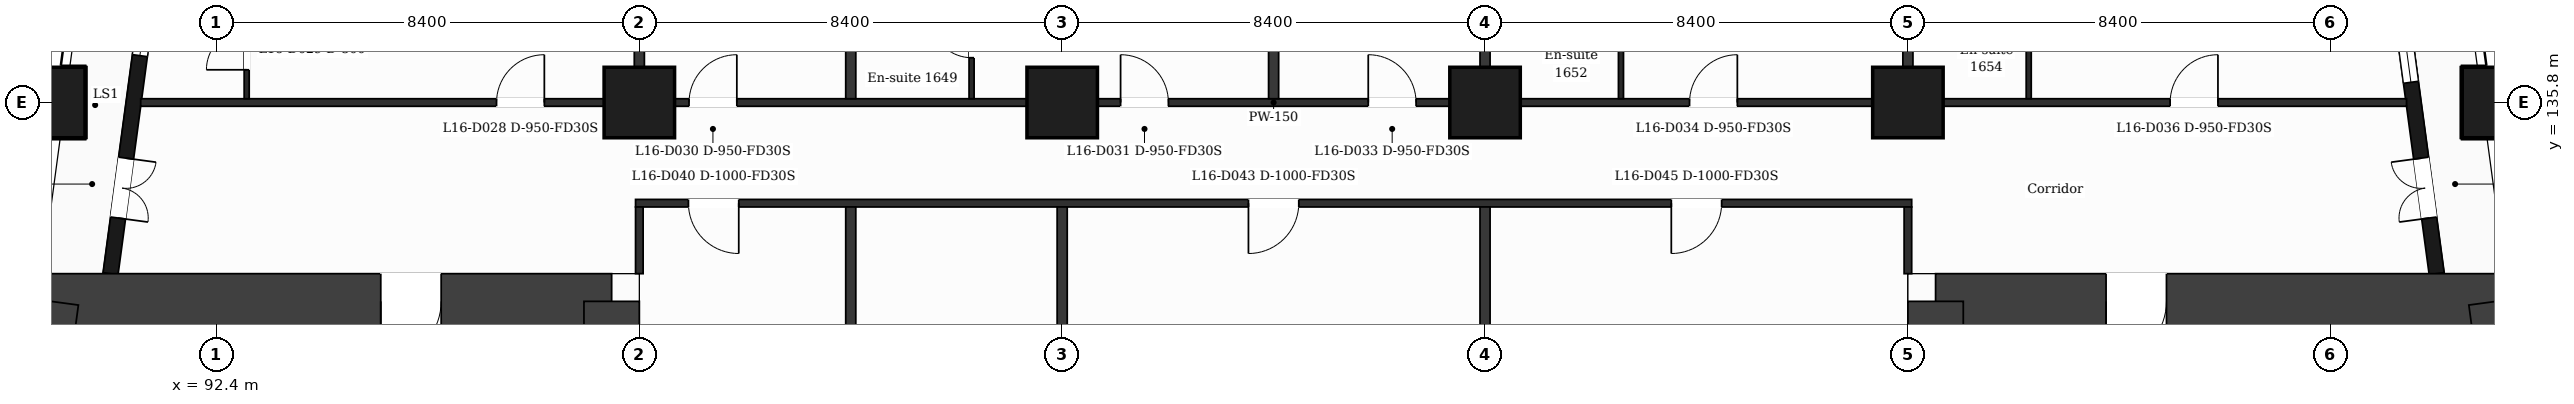
"""IFC4 building model, lengths in metres.
Left out: names, types, materials, properties, quantities, classifications, styles, units other than length and angle.
Written with IfcOpenShell. Run it as: python <this file> out.ifc"""

import sys

from ifc_helpers import new_model, si_unit, direction, frame, frame_2d, origin, origin_2d, place, context, subcontext, project, spatial, rectangle, extrude, element, fill, save


model = new_model("IFC4")
c1 = context("Model", 3, precision=1e-05, world=origin(), true_north=direction((0.0, 1.0)))
c2 = subcontext(c1, "Body", "Model", "MODEL_VIEW")
j1 = project(units=[si_unit("LENGTHUNIT", "METRE"), si_unit("PLANEANGLEUNIT", "RADIAN")], contexts=[c1])
p1 = place(None, origin())
s1 = spatial("IfcSite", under=j1, at=p1, CompositionType="ELEMENT")
p2 = place(p1, origin())
s2 = spatial("IfcBuilding", under=s1, at=p2, CompositionType="ELEMENT")
p3 = place(p2, frame((0.0, 0.0, 74.0)))
s3 = spatial("IfcBuildingStorey", under=s2, at=p3, CompositionType="ELEMENT", Elevation=74.0)
p4 = place(p3, frame((89.112, 131.85, 0.0), z_axis=(0.0, 0.0, 1.0), x_axis=(1.0, 0.0, 0.0)))
e1 = element("IfcWall", 1, at=p4, inside=s3, PredefinedType="SHEAR", context=c2, shape_type="SweptSolid", body=[
    extrude(rectangle(XDim=11.138, YDim=1.1, at=frame_2d((5.569, 0.0))), origin(), (0.0, 0.0, 1.0), 3.5),
])
p5 = place(p4, frame((6.552, 0.0, 0.0)))
e2 = element("IfcOpeningElement", 2, at=p5, cuts=e1, PredefinedType="OPENING", context=c2, shape_type="SweptSolid", body=[
    extrude(rectangle(XDim=1.2, YDim=2.1, at=frame_2d((0.6, 1.05))), frame((0.0, 0.56, 0.0), z_axis=(0.0, -1.0, 0.0), x_axis=(1.0, 0.0, 0.0)), (0.0, 0.0, 1.0), 1.12),
])
p6 = place(p3, frame((100.25, 131.85, 0.0), z_axis=(0.0, 0.0, 1.0), x_axis=(0.0, -1.0, 0.0)))
e3 = element("IfcWall", 3, at=p6, inside=s3, PredefinedType="SHEAR", context=c2, shape_type="SweptSolid", body=[
    extrude(rectangle(XDim=20.9, YDim=1.1, at=frame_2d((10.45, 0.0))), origin(), (0.0, 0.0, 1.0), 3.5),
])
p7 = place(p3, frame((86.298, 110.95, 0.0), z_axis=(0.0, 0.0, 1.0), x_axis=(0.133400422634, 0.99106222168, 0.0)))
e4 = element("IfcWall", 4, at=p7, inside=s3, PredefinedType="SHEAR", context=c2, shape_type="SweptSolid", body=[
    extrude(rectangle(XDim=21.089, YDim=1.1, at=frame_2d((10.544, 0.0))), origin(), (0.0, 0.0, 1.0), 3.5),
])
p8 = place(p3, frame((126.55, 131.85, 0.0), z_axis=(0.0, 0.0, 1.0), x_axis=(1.0, 0.0, 0.0)))
e5 = element("IfcWall", 5, at=p8, inside=s3, PredefinedType="SHEAR", context=c2, shape_type="SweptSolid", body=[
    extrude(rectangle(XDim=11.138, YDim=1.1, at=frame_2d((5.569, 0.0))), origin(), (0.0, 0.0, 1.0), 3.5),
])
p9 = place(p8, frame((3.386, 0.0, 0.0)))
e6 = element("IfcOpeningElement", 6, at=p9, cuts=e5, PredefinedType="OPENING", context=c2, shape_type="SweptSolid", body=[
    extrude(rectangle(XDim=1.2, YDim=2.1, at=frame_2d((0.6, 1.05))), frame((0.0, 0.56, 0.0), z_axis=(0.0, -1.0, 0.0), x_axis=(1.0, 0.0, 0.0)), (0.0, 0.0, 1.0), 1.12),
])
p10 = place(p3, frame((137.688, 131.85, 0.0), z_axis=(0.0, 0.0, 1.0), x_axis=(0.133411793472, -0.991060691059, 0.0)))
e7 = element("IfcWall", 7, at=p10, inside=s3, PredefinedType="SHEAR", context=c2, shape_type="SweptSolid", body=[
    extrude(rectangle(XDim=21.089, YDim=1.1, at=frame_2d((10.544, 0.0))), origin(), (0.0, 0.0, 1.0), 3.5),
])
p11 = place(p3, frame((126.55, 110.95, 0.0), z_axis=(0.0, 0.0, 1.0), x_axis=(0.0, 1.0, 0.0)))
e8 = element("IfcWall", 8, at=p11, inside=s3, PredefinedType="SHEAR", context=c2, shape_type="SweptSolid", body=[
    extrude(rectangle(XDim=20.9, YDim=1.1, at=frame_2d((10.45, 0.0))), origin(), (0.0, 0.0, 1.0), 3.5),
])
for number, where, z_axis, x_axis in (
    (9, (100.8, 135.8, 0.0), (0.0, 0.0, 1.0), (1.0, 0.0, 0.0)),
    (10, (109.2, 135.8, 0.0), (0.0, 0.0, 1.0), (1.0, 0.0, 0.0)),
    (11, (117.6, 135.8, 0.0), (0.0, 0.0, 1.0), (1.0, 0.0, 0.0)),
    (12, (126.0, 135.8, 0.0), (0.0, 0.0, 1.0), (1.0, 0.0, 0.0)),
    (13, (89.088, 135.8, 0.0), (0.0, 0.0, 1.0), (1.0, 0.0, 0.0)),
    (14, (137.711, 135.8, 0.0), (0.0, 0.0, 1.0), (1.0, 0.0, 0.0)),
):
    element("IfcColumn", number, at=place(p3, frame(where, z_axis=z_axis, x_axis=x_axis)), inside=s3, PredefinedType="COLUMN", context=c2, shape_type="SweptSolid", body=[
        extrude(rectangle(XDim=1.4, YDim=1.4, at=origin_2d()), origin(), (0.0, 0.0, 1.0), 3.5),
    ])
p12 = place(p3, frame((136.504, 132.4, 0.0), z_axis=(0.0, 0.0, 1.0), x_axis=(-0.133399697462, 0.99106231929, 0.0)))
e15 = element("IfcWall", 15, at=p12, inside=s3, PredefinedType="SOLIDWALL", context=c2, shape_type="SweptSolid", body=[
    extrude(rectangle(XDim=6.74, YDim=0.3, at=frame_2d((3.37, 0.0))), origin(), (0.0, 0.0, 1.0), 3.18),
])
p13 = place(p12, frame((1.115, 0.0, 0.0)))
e16 = element("IfcOpeningElement", 16, at=p13, cuts=e15, PredefinedType="OPENING", context=c2, shape_type="SweptSolid", body=[
    extrude(rectangle(XDim=1.2, YDim=2.4, at=frame_2d((0.6, 1.2))), frame((0.0, 0.16, 0.0), z_axis=(0.0, -1.0, 0.0), x_axis=(1.0, 0.0, 0.0)), (0.0, 0.0, 1.0), 0.32),
])
p14 = place(p12, frame((3.835, 0.0, 0.9)))
e17 = element("IfcOpeningElement", 17, at=p14, cuts=e15, PredefinedType="OPENING", context=c2, shape_type="SweptSolid", body=[
    extrude(rectangle(XDim=2.4, YDim=2.1, at=frame_2d((1.2, 1.05))), frame((0.0, 0.16, 0.0), z_axis=(0.0, -1.0, 0.0), x_axis=(1.0, 0.0, 0.0)), (0.0, 0.0, 1.0), 0.32),
])
p15 = place(p3, frame((91.177, 138.95, 0.0), z_axis=(0.0, 0.0, 1.0), x_axis=(-0.133426664613, -0.991058689065, 0.0)))
e18 = element("IfcWall", 18, at=p15, inside=s3, PredefinedType="SOLIDWALL", context=c2, shape_type="SweptSolid", body=[
    extrude(rectangle(XDim=6.609, YDim=0.3, at=frame_2d((3.305, 0.0))), origin(), (0.0, 0.0, 1.0), 3.18),
])
p16 = place(p15, frame((1.039, 0.0, 0.9)))
e19 = element("IfcOpeningElement", 19, at=p16, cuts=e18, PredefinedType="OPENING", context=c2, shape_type="SweptSolid", body=[
    extrude(rectangle(XDim=1.2, YDim=2.1, at=frame_2d((0.6, 1.05))), frame((0.0, 0.16, 0.0), z_axis=(0.0, -1.0, 0.0), x_axis=(1.0, 0.0, 0.0)), (0.0, 0.0, 1.0), 0.32),
])
p17 = place(p15, frame((4.294, 0.0, 0.0)))
e20 = element("IfcOpeningElement", 20, at=p17, cuts=e18, PredefinedType="OPENING", context=c2, shape_type="SweptSolid", body=[
    extrude(rectangle(XDim=1.2, YDim=2.4, at=frame_2d((0.6, 1.2))), frame((0.0, 0.16, 0.0), z_axis=(0.0, -1.0, 0.0), x_axis=(1.0, 0.0, 0.0)), (0.0, 0.0, 1.0), 0.32),
])
p18 = place(p3, frame((100.725, 133.8, 0.0), z_axis=(0.0, 0.0, 1.0), x_axis=(1.0, 0.0, 0.0)))
e21 = element("IfcWall", 21, at=p18, inside=s3, PredefinedType="PARTITIONING", context=c2, shape_type="SweptSolid", body=[
    extrude(rectangle(XDim=25.35, YDim=0.15, at=frame_2d((12.675, 0.0))), origin(), (0.0, 0.0, 1.0), 3.18),
])
p19 = place(p18, frame((1.05, 0.0, 0.0)))
e22 = element("IfcOpeningElement", 22, at=p19, cuts=e21, PredefinedType="OPENING", context=c2, shape_type="SweptSolid", body=[
    extrude(rectangle(XDim=1.0, YDim=2.1, at=frame_2d((0.5, 1.05))), frame((0.0, 0.085, 0.0), z_axis=(0.0, -1.0, 0.0), x_axis=(1.0, 0.0, 0.0)), (0.0, 0.0, 1.0), 0.17),
])
p20 = place(p18, frame((12.175, 0.0, 0.0)))
e23 = element("IfcOpeningElement", 23, at=p20, cuts=e21, PredefinedType="OPENING", context=c2, shape_type="SweptSolid", body=[
    extrude(rectangle(XDim=1.0, YDim=2.1, at=frame_2d((0.5, 1.05))), frame((0.0, 0.085, 0.0), z_axis=(0.0, -1.0, 0.0), x_axis=(1.0, 0.0, 0.0)), (0.0, 0.0, 1.0), 0.17),
])
p21 = place(p18, frame((20.575, 0.0, 0.0)))
e24 = element("IfcOpeningElement", 24, at=p21, cuts=e21, PredefinedType="OPENING", context=c2, shape_type="SweptSolid", body=[
    extrude(rectangle(XDim=1.0, YDim=2.1, at=frame_2d((0.5, 1.05))), frame((0.0, 0.085, 0.0), z_axis=(0.0, -1.0, 0.0), x_axis=(1.0, 0.0, 0.0)), (0.0, 0.0, 1.0), 0.17),
])
p22 = place(p3, frame((90.895, 135.8, 0.0), z_axis=(0.0, 0.0, 1.0), x_axis=(1.0, 0.0, 0.0)))
e25 = element("IfcWall", 25, at=p22, inside=s3, PredefinedType="PARTITIONING", context=c2, shape_type="SweptSolid", body=[
    extrude(rectangle(XDim=45.011, YDim=0.15, at=frame_2d((22.505, 0.0))), origin(), (0.0, 0.0, 1.0), 3.18),
])
p23 = place(p22, frame((7.068, 0.0, 0.0)))
e26 = element("IfcOpeningElement", 26, at=p23, cuts=e25, PredefinedType="OPENING", context=c2, shape_type="SweptSolid", body=[
    extrude(rectangle(XDim=0.95, YDim=2.1, at=frame_2d((0.475, 1.05))), frame((0.0, 0.085, 0.0), z_axis=(0.0, -1.0, 0.0), x_axis=(1.0, 0.0, 0.0)), (0.0, 0.0, 1.0), 0.17),
])
p24 = place(p22, frame((10.892, 0.0, 0.0)))
e27 = element("IfcOpeningElement", 27, at=p24, cuts=e25, PredefinedType="OPENING", context=c2, shape_type="SweptSolid", body=[
    extrude(rectangle(XDim=0.95, YDim=2.1, at=frame_2d((0.475, 1.05))), frame((0.0, 0.085, 0.0), z_axis=(0.0, -1.0, 0.0), x_axis=(1.0, 0.0, 0.0)), (0.0, 0.0, 1.0), 0.17),
])
p25 = place(p22, frame((19.465, 0.0, 0.0)))
e28 = element("IfcOpeningElement", 28, at=p25, cuts=e25, PredefinedType="OPENING", context=c2, shape_type="SweptSolid", body=[
    extrude(rectangle(XDim=0.95, YDim=2.1, at=frame_2d((0.475, 1.05))), frame((0.0, 0.085, 0.0), z_axis=(0.0, -1.0, 0.0), x_axis=(1.0, 0.0, 0.0)), (0.0, 0.0, 1.0), 0.17),
])
p26 = place(p22, frame((24.385, 0.0, 0.0)))
e29 = element("IfcOpeningElement", 29, at=p26, cuts=e25, PredefinedType="OPENING", context=c2, shape_type="SweptSolid", body=[
    extrude(rectangle(XDim=0.95, YDim=2.1, at=frame_2d((0.475, 1.05))), frame((0.0, 0.085, 0.0), z_axis=(0.0, -1.0, 0.0), x_axis=(1.0, 0.0, 0.0)), (0.0, 0.0, 1.0), 0.17),
])
p27 = place(p22, frame((30.767, 0.0, 0.0)))
e30 = element("IfcOpeningElement", 30, at=p27, cuts=e25, PredefinedType="OPENING", context=c2, shape_type="SweptSolid", body=[
    extrude(rectangle(XDim=0.95, YDim=2.1, at=frame_2d((0.475, 1.05))), frame((0.0, 0.085, 0.0), z_axis=(0.0, -1.0, 0.0), x_axis=(1.0, 0.0, 0.0)), (0.0, 0.0, 1.0), 0.17),
])
p28 = place(p22, frame((40.314, 0.0, 0.0)))
e31 = element("IfcOpeningElement", 31, at=p28, cuts=e25, PredefinedType="OPENING", context=c2, shape_type="SweptSolid", body=[
    extrude(rectangle(XDim=0.95, YDim=2.1, at=frame_2d((0.475, 1.05))), frame((0.0, 0.085, 0.0), z_axis=(0.0, -1.0, 0.0), x_axis=(1.0, 0.0, 0.0)), (0.0, 0.0, 1.0), 0.17),
])
p29 = place(p3, frame((93.0, 135.875, 0.0), z_axis=(0.0, 0.0, 1.0), x_axis=(0.0, 1.0, 0.0)))
e32 = element("IfcWall", 32, at=p29, inside=s3, PredefinedType="PARTITIONING", context=c2, shape_type="SweptSolid", body=[
    extrude(rectangle(XDim=2.575, YDim=0.1, at=frame_2d((1.288, 0.0))), origin(), (0.0, 0.0, 1.0), 3.18),
])
p30 = place(p29, frame((0.575, 0.0, 0.0)))
e33 = element("IfcOpeningElement", 33, at=p30, cuts=e32, PredefinedType="OPENING", context=c2, shape_type="SweptSolid", body=[
    extrude(rectangle(XDim=0.8, YDim=2.1, at=frame_2d((0.4, 1.05))), frame((0.0, 0.06, 0.0), z_axis=(0.0, -1.0, 0.0), x_axis=(1.0, 0.0, 0.0)), (0.0, 0.0, 1.0), 0.12),
])
p31 = place(p3, frame((100.8, 135.875, 0.0), z_axis=(0.0, 0.0, 1.0), x_axis=(0.0, 1.0, 0.0)))
e34 = element("IfcWall", 34, at=p31, inside=s3, PredefinedType="PARTITIONING", context=c2, shape_type="SweptSolid", body=[
    extrude(rectangle(XDim=7.135, YDim=0.2, at=frame_2d((3.567, 0.0))), origin(), (0.0, 0.0, 1.0), 3.18),
])
p32 = place(p3, frame((100.8, 132.4, 0.0), z_axis=(0.0, 0.0, 1.0), x_axis=(0.0, 1.0, 0.0)))
e35 = element("IfcWall", 35, at=p32, inside=s3, PredefinedType="PARTITIONING", context=c2, shape_type="SweptSolid", body=[
    extrude(rectangle(XDim=1.325, YDim=0.15, at=frame_2d((0.663, 0.0))), origin(), (0.0, 0.0, 1.0), 3.18),
])
p33 = place(p3, frame((105.0, 109.075, 0.0), z_axis=(0.0, 0.0, 1.0), x_axis=(0.0, 1.0, 0.0)))
e36 = element("IfcWall", 36, at=p33, inside=s3, PredefinedType="PARTITIONING", context=c2, shape_type="SweptSolid", body=[
    extrude(rectangle(XDim=24.65, YDim=0.2, at=frame_2d((12.325, 0.0))), origin(), (0.0, 0.0, 1.0), 3.18),
])
p34 = place(p3, frame((105.0, 135.875, 0.0), z_axis=(0.0, 0.0, 1.0), x_axis=(0.0, 1.0, 0.0)))
e37 = element("IfcWall", 37, at=p34, inside=s3, PredefinedType="PARTITIONING", context=c2, shape_type="SweptSolid", body=[
    extrude(rectangle(XDim=7.135, YDim=0.2, at=frame_2d((3.567, 0.0))), origin(), (0.0, 0.0, 1.0), 3.18),
])
p35 = place(p3, frame((107.4, 135.875, 0.0), z_axis=(0.0, 0.0, 1.0), x_axis=(0.0, 1.0, 0.0)))
e38 = element("IfcWall", 38, at=p35, inside=s3, PredefinedType="PARTITIONING", context=c2, shape_type="SweptSolid", body=[
    extrude(rectangle(XDim=2.275, YDim=0.1, at=frame_2d((1.137, 0.0))), origin(), (0.0, 0.0, 1.0), 3.18),
])
p36 = place(p35, frame((0.815, 0.0, 0.0)))
e39 = element("IfcOpeningElement", 39, at=p36, cuts=e38, PredefinedType="OPENING", context=c2, shape_type="SweptSolid", body=[
    extrude(rectangle(XDim=0.8, YDim=2.1, at=frame_2d((0.4, 1.05))), frame((0.0, 0.06, 0.0), z_axis=(0.0, -1.0, 0.0), x_axis=(1.0, 0.0, 0.0)), (0.0, 0.0, 1.0), 0.12),
])
p37 = place(p3, frame((109.2, 109.075, 0.0), z_axis=(0.0, 0.0, 1.0), x_axis=(0.0, 1.0, 0.0)))
e40 = element("IfcWall", 40, at=p37, inside=s3, PredefinedType="PARTITIONING", context=c2, shape_type="SweptSolid", body=[
    extrude(rectangle(XDim=24.65, YDim=0.2, at=frame_2d((12.325, 0.0))), origin(), (0.0, 0.0, 1.0), 3.18),
])
p38 = place(p3, frame((113.4, 135.875, 0.0), z_axis=(0.0, 0.0, 1.0), x_axis=(0.0, 1.0, 0.0)))
e41 = element("IfcWall", 41, at=p38, inside=s3, PredefinedType="PARTITIONING", context=c2, shape_type="SweptSolid", body=[
    extrude(rectangle(XDim=8.085, YDim=0.2, at=frame_2d((4.042, 0.0))), origin(), (0.0, 0.0, 1.0), 3.18),
])
p39 = place(p3, frame((117.6, 109.075, 0.0), z_axis=(0.0, 0.0, 1.0), x_axis=(0.0, 1.0, 0.0)))
e42 = element("IfcWall", 42, at=p39, inside=s3, PredefinedType="PARTITIONING", context=c2, shape_type="SweptSolid", body=[
    extrude(rectangle(XDim=24.65, YDim=0.2, at=frame_2d((12.325, 0.0))), origin(), (0.0, 0.0, 1.0), 3.18),
])
p40 = place(p3, frame((117.6, 135.875, 0.0), z_axis=(0.0, 0.0, 1.0), x_axis=(0.0, 1.0, 0.0)))
e43 = element("IfcWall", 43, at=p40, inside=s3, PredefinedType="PARTITIONING", context=c2, shape_type="SweptSolid", body=[
    extrude(rectangle(XDim=7.135, YDim=0.2, at=frame_2d((3.567, 0.0))), origin(), (0.0, 0.0, 1.0), 3.18),
])
p41 = place(p3, frame((120.3, 135.875, 0.0), z_axis=(0.0, 0.0, 1.0), x_axis=(0.0, 1.0, 0.0)))
e44 = element("IfcWall", 44, at=p41, inside=s3, PredefinedType="PARTITIONING", context=c2, shape_type="SweptSolid", body=[
    extrude(rectangle(XDim=1.975, YDim=0.1, at=frame_2d((0.988, 0.0))), origin(), (0.0, 0.0, 1.0), 3.18),
])
p42 = place(p3, frame((126.0, 135.875, 0.0), z_axis=(0.0, 0.0, 1.0), x_axis=(0.0, 1.0, 0.0)))
e45 = element("IfcWall", 45, at=p42, inside=s3, PredefinedType="PARTITIONING", context=c2, shape_type="SweptSolid", body=[
    extrude(rectangle(XDim=7.135, YDim=0.2, at=frame_2d((3.567, 0.0))), origin(), (0.0, 0.0, 1.0), 3.18),
])
p43 = place(p3, frame((126.0, 132.4, 0.0), z_axis=(0.0, 0.0, 1.0), x_axis=(0.0, 1.0, 0.0)))
e46 = element("IfcWall", 46, at=p43, inside=s3, PredefinedType="PARTITIONING", context=c2, shape_type="SweptSolid", body=[
    extrude(rectangle(XDim=1.325, YDim=0.15, at=frame_2d((0.663, 0.0))), origin(), (0.0, 0.0, 1.0), 3.18),
])
p44 = place(p3, frame((128.4, 135.875, 0.0), z_axis=(0.0, 0.0, 1.0), x_axis=(0.0, 1.0, 0.0)))
e47 = element("IfcWall", 47, at=p44, inside=s3, PredefinedType="PARTITIONING", context=c2, shape_type="SweptSolid", body=[
    extrude(rectangle(XDim=1.975, YDim=0.1, at=frame_2d((0.988, 0.0))), origin(), (0.0, 0.0, 1.0), 3.18),
])
p45 = place(p13, origin())
e48 = element("IfcDoor", 48, at=p45, inside=s3, OperationType="DOUBLE_DOOR_SINGLE_SWING", PredefinedType="DOOR", context=c2, shape_type="SweptSolid", body=[
    extrude(rectangle(XDim=1.2, YDim=2.4, at=frame_2d((0.6, 1.2))), frame((0.0, 0.025, 0.0), z_axis=(0.0, -1.0, 0.0), x_axis=(1.0, 0.0, 0.0)), (0.0, 0.0, 1.0), 0.05),
])
fill(e16, e48)
p46 = place(p14, origin())
e49 = element("IfcWindow", 49, at=p46, inside=s3, PartitioningType="SINGLE_PANEL", PredefinedType="WINDOW", context=c2, shape_type="SweptSolid", body=[
    extrude(rectangle(XDim=2.4, YDim=2.1, at=frame_2d((1.2, 1.05))), frame((0.0, 0.03, 0.0), z_axis=(0.0, -1.0, 0.0), x_axis=(1.0, 0.0, 0.0)), (0.0, 0.0, 1.0), 0.06),
])
fill(e17, e49)
p47 = place(p16, origin())
e50 = element("IfcWindow", 50, at=p47, inside=s3, PartitioningType="SINGLE_PANEL", PredefinedType="WINDOW", context=c2, shape_type="SweptSolid", body=[
    extrude(rectangle(XDim=1.2, YDim=2.1, at=frame_2d((0.6, 1.05))), frame((0.0, 0.03, 0.0), z_axis=(0.0, -1.0, 0.0), x_axis=(1.0, 0.0, 0.0)), (0.0, 0.0, 1.0), 0.06),
])
fill(e19, e50)
p48 = place(p17, origin())
e51 = element("IfcDoor", 51, at=p48, inside=s3, OperationType="DOUBLE_DOOR_SINGLE_SWING", PredefinedType="DOOR", context=c2, shape_type="SweptSolid", body=[
    extrude(rectangle(XDim=1.2, YDim=2.4, at=frame_2d((0.6, 1.2))), frame((0.0, 0.025, 0.0), z_axis=(0.0, -1.0, 0.0), x_axis=(1.0, 0.0, 0.0)), (0.0, 0.0, 1.0), 0.05),
])
fill(e20, e51)
p49 = place(p23, origin())
e52 = element("IfcDoor", 52, at=p49, inside=s3, OperationType="SINGLE_SWING_RIGHT", PredefinedType="DOOR", context=c2, shape_type="SweptSolid", body=[
    extrude(rectangle(XDim=0.95, YDim=2.1, at=frame_2d((0.475, 1.05))), frame((0.0, 0.025, 0.0), z_axis=(0.0, -1.0, 0.0), x_axis=(1.0, 0.0, 0.0)), (0.0, 0.0, 1.0), 0.05),
])
fill(e26, e52)
p50 = place(p30, origin())
e53 = element("IfcDoor", 53, at=p50, inside=s3, OperationType="SINGLE_SWING_LEFT", PredefinedType="DOOR", context=c2, shape_type="SweptSolid", body=[
    extrude(rectangle(XDim=0.8, YDim=2.1, at=frame_2d((0.4, 1.05))), frame((0.0, 0.025, 0.0), z_axis=(0.0, -1.0, 0.0), x_axis=(1.0, 0.0, 0.0)), (0.0, 0.0, 1.0), 0.05),
])
fill(e33, e53)
p51 = place(p24, origin())
e54 = element("IfcDoor", 54, at=p51, inside=s3, OperationType="SINGLE_SWING_RIGHT", PredefinedType="DOOR", context=c2, shape_type="SweptSolid", body=[
    extrude(rectangle(XDim=0.95, YDim=2.1, at=frame_2d((0.475, 1.05))), frame((0.0, 0.025, 0.0), z_axis=(0.0, -1.0, 0.0), x_axis=(1.0, 0.0, 0.0)), (0.0, 0.0, 1.0), 0.05),
])
fill(e27, e54)
p52 = place(p25, origin())
e55 = element("IfcDoor", 55, at=p52, inside=s3, OperationType="SINGLE_SWING_LEFT", PredefinedType="DOOR", context=c2, shape_type="SweptSolid", body=[
    extrude(rectangle(XDim=0.95, YDim=2.1, at=frame_2d((0.475, 1.05))), frame((0.0, 0.025, 0.0), z_axis=(0.0, -1.0, 0.0), x_axis=(1.0, 0.0, 0.0)), (0.0, 0.0, 1.0), 0.05),
])
fill(e28, e55)
p53 = place(p36, origin())
e56 = element("IfcDoor", 56, at=p53, inside=s3, OperationType="SINGLE_SWING_RIGHT", PredefinedType="DOOR", context=c2, shape_type="SweptSolid", body=[
    extrude(rectangle(XDim=0.8, YDim=2.1, at=frame_2d((0.4, 1.05))), frame((0.0, 0.025, 0.0), z_axis=(0.0, -1.0, 0.0), x_axis=(1.0, 0.0, 0.0)), (0.0, 0.0, 1.0), 0.05),
])
fill(e39, e56)
p54 = place(p26, origin())
e57 = element("IfcDoor", 57, at=p54, inside=s3, OperationType="SINGLE_SWING_LEFT", PredefinedType="DOOR", context=c2, shape_type="SweptSolid", body=[
    extrude(rectangle(XDim=0.95, YDim=2.1, at=frame_2d((0.475, 1.05))), frame((0.0, 0.025, 0.0), z_axis=(0.0, -1.0, 0.0), x_axis=(1.0, 0.0, 0.0)), (0.0, 0.0, 1.0), 0.05),
])
fill(e29, e57)
p55 = place(p27, origin())
e58 = element("IfcDoor", 58, at=p55, inside=s3, OperationType="SINGLE_SWING_RIGHT", PredefinedType="DOOR", context=c2, shape_type="SweptSolid", body=[
    extrude(rectangle(XDim=0.95, YDim=2.1, at=frame_2d((0.475, 1.05))), frame((0.0, 0.025, 0.0), z_axis=(0.0, -1.0, 0.0), x_axis=(1.0, 0.0, 0.0)), (0.0, 0.0, 1.0), 0.05),
])
fill(e30, e58)
p56 = place(p28, origin())
e59 = element("IfcDoor", 59, at=p56, inside=s3, OperationType="SINGLE_SWING_RIGHT", PredefinedType="DOOR", context=c2, shape_type="SweptSolid", body=[
    extrude(rectangle(XDim=0.95, YDim=2.1, at=frame_2d((0.475, 1.05))), frame((0.0, 0.025, 0.0), z_axis=(0.0, -1.0, 0.0), x_axis=(1.0, 0.0, 0.0)), (0.0, 0.0, 1.0), 0.05),
])
fill(e31, e59)
p57 = place(p19, origin())
e60 = element("IfcDoor", 60, at=p57, inside=s3, OperationType="SINGLE_SWING_RIGHT", PredefinedType="DOOR", context=c2, shape_type="SweptSolid", body=[
    extrude(rectangle(XDim=1.0, YDim=2.1, at=frame_2d((0.5, 1.05))), frame((0.0, 0.025, 0.0), z_axis=(0.0, -1.0, 0.0), x_axis=(1.0, 0.0, 0.0)), (0.0, 0.0, 1.0), 0.05),
])
fill(e22, e60)
p58 = place(p20, origin())
e61 = element("IfcDoor", 61, at=p58, inside=s3, OperationType="SINGLE_SWING_LEFT", PredefinedType="DOOR", context=c2, shape_type="SweptSolid", body=[
    extrude(rectangle(XDim=1.0, YDim=2.1, at=frame_2d((0.5, 1.05))), frame((0.0, 0.025, 0.0), z_axis=(0.0, -1.0, 0.0), x_axis=(1.0, 0.0, 0.0)), (0.0, 0.0, 1.0), 0.05),
])
fill(e23, e61)
p59 = place(p21, origin())
e62 = element("IfcDoor", 62, at=p59, inside=s3, OperationType="SINGLE_SWING_LEFT", PredefinedType="DOOR", context=c2, shape_type="SweptSolid", body=[
    extrude(rectangle(XDim=1.0, YDim=2.1, at=frame_2d((0.5, 1.05))), frame((0.0, 0.025, 0.0), z_axis=(0.0, -1.0, 0.0), x_axis=(1.0, 0.0, 0.0)), (0.0, 0.0, 1.0), 0.05),
])
fill(e24, e62)
p60 = place(p5, origin())
e63 = element("IfcDoor", 63, at=p60, inside=s3, OperationType="SINGLE_SWING_LEFT", PredefinedType="DOOR", context=c2, shape_type="SweptSolid", body=[
    extrude(rectangle(XDim=1.2, YDim=2.1, at=frame_2d((0.6, 1.05))), frame((0.0, 0.025, 0.0), z_axis=(0.0, -1.0, 0.0), x_axis=(1.0, 0.0, 0.0)), (0.0, 0.0, 1.0), 0.05),
])
fill(e2, e63)
p61 = place(p9, origin())
e64 = element("IfcDoor", 64, at=p61, inside=s3, OperationType="SINGLE_SWING_LEFT", PredefinedType="DOOR", context=c2, shape_type="SweptSolid", body=[
    extrude(rectangle(XDim=1.2, YDim=2.1, at=frame_2d((0.6, 1.05))), frame((0.0, 0.025, 0.0), z_axis=(0.0, -1.0, 0.0), x_axis=(1.0, 0.0, 0.0)), (0.0, 0.0, 1.0), 0.05),
])
fill(e6, e64)
save(model, sys.argv[1])
